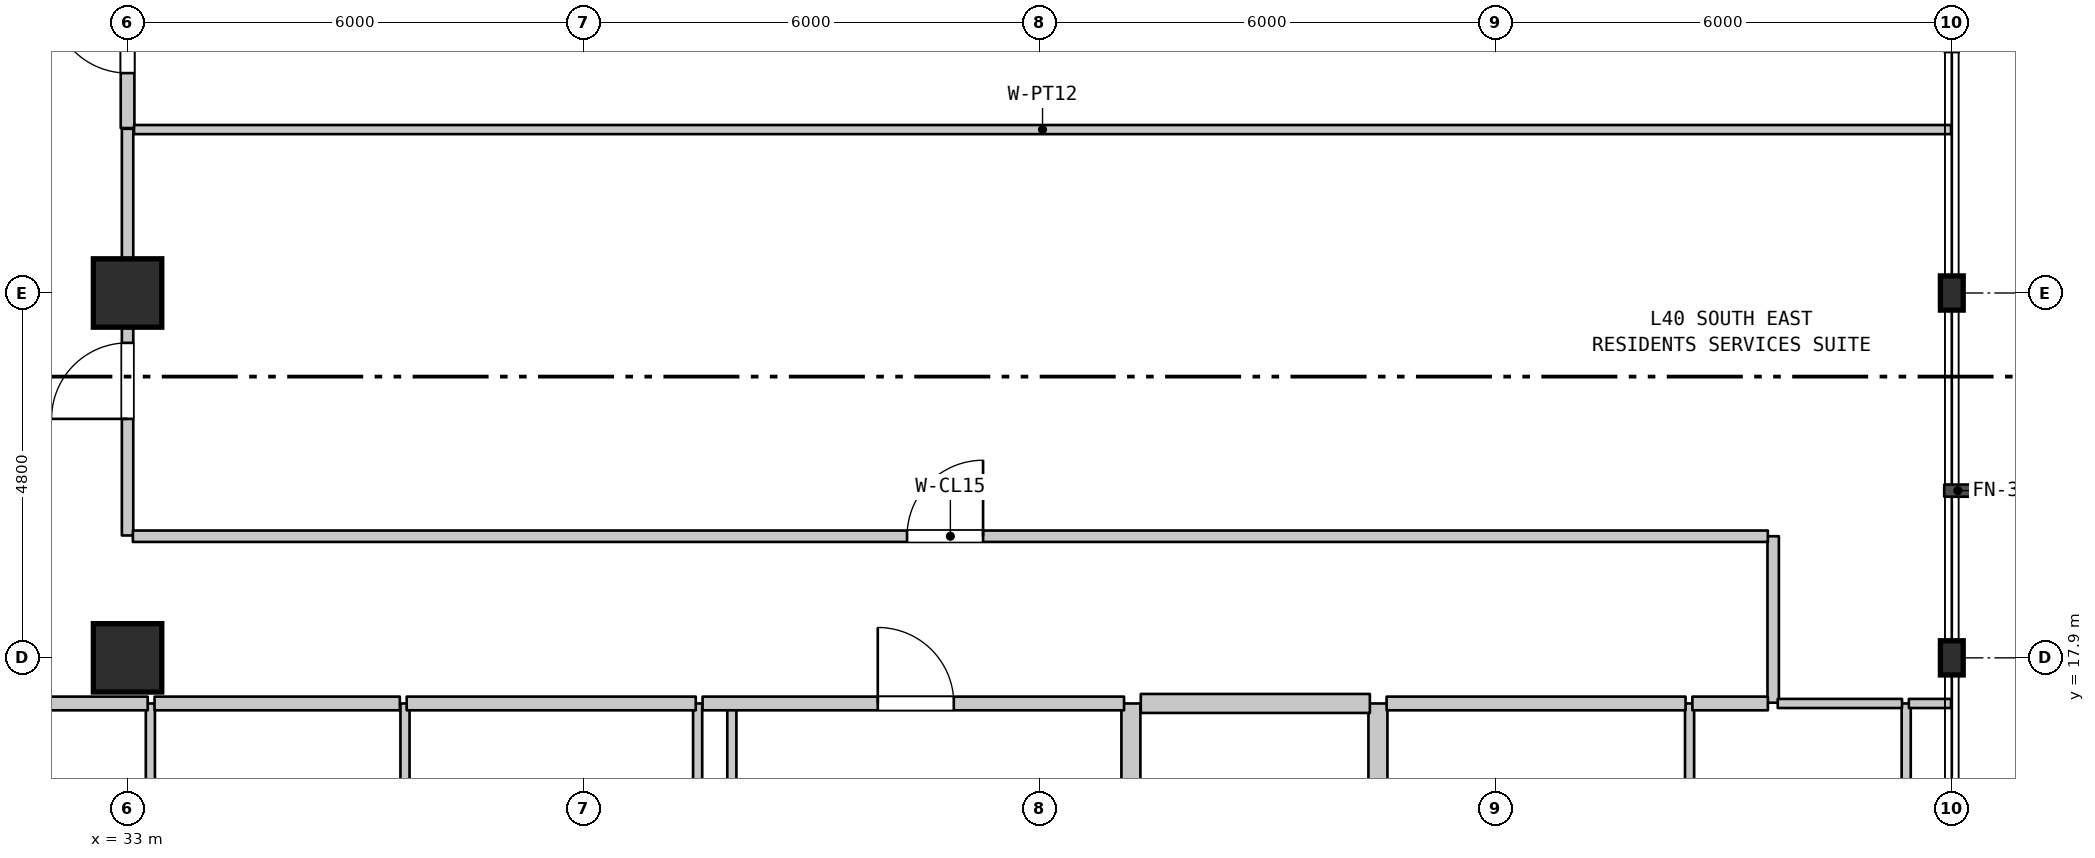
"""IFC4 building model, lengths in metres.
Left out: names, types, materials, properties, quantities, classifications, styles, units other than length and angle.
Written with IfcOpenShell. Run it as: python <this file> out.ifc"""

import sys

from ifc_helpers import new_model, si_unit, direction, frame, frame_2d, origin, origin_2d, place, context, subcontext, project, spatial, rectangle, i_section, extrude, element, fill, save


model = new_model("IFC4")
c1 = context("Model", 3, precision=1e-05, world=origin(), true_north=direction((0.0, 1.0)))
c2 = subcontext(c1, "Body", "Model", "MODEL_VIEW")
j1 = project(units=[si_unit("LENGTHUNIT", "METRE"), si_unit("PLANEANGLEUNIT", "RADIAN")], contexts=[c1])
p1 = place(None, origin())
s1 = spatial("IfcSite", under=j1, at=p1, CompositionType="ELEMENT")
p2 = place(p1, origin())
s2 = spatial("IfcBuilding", under=s1, at=p2, CompositionType="ELEMENT")
p3 = place(p2, frame((0.0, 0.0, 164.6)))
s3 = spatial("IfcBuildingStorey", under=s2, at=p3, CompositionType="ELEMENT", Elevation=164.6)
for number, where, z_axis, x_axis in (
    (1, (33.0, 17.9, 0.0), (0.0, 0.0, 1.0), (1.0, 0.0, 0.0)),
    (2, (33.0, 22.7, 0.0), (0.0, 0.0, 1.0), (1.0, 0.0, 0.0)),
):
    element("IfcColumn", number, at=place(p3, frame(where, z_axis=z_axis, x_axis=x_axis)), inside=s3, PredefinedType="COLUMN", context=c2, shape_type="SweptSolid", body=[
        extrude(rectangle(XDim=0.9, YDim=0.9, at=origin_2d()), origin(), (0.0, 0.0, 1.0), 4.5),
    ])
for number, where, z_axis, x_axis in (
    (3, (57.0, 17.9, 0.0), (0.0, 0.0, 1.0), (1.0, 0.0, 0.0)),
    (4, (57.0, 22.7, 0.0), (0.0, 0.0, 1.0), (1.0, 0.0, 0.0)),
):
    element("IfcColumn", number, at=place(p3, frame(where, z_axis=z_axis, x_axis=x_axis)), inside=s3, PredefinedType="COLUMN", context=c2, shape_type="SweptSolid", body=[
        extrude(i_section(OverallWidth=0.3, OverallDepth=0.45, WebThickness=0.014, FlangeThickness=0.026, FilletRadius=0.027, at=origin_2d()), origin(), (0.0, 0.0, 1.0), 4.5),
    ])
p4 = place(p3, frame((33.0, 19.51, 0.0), z_axis=(0.0, 0.0, 1.0), x_axis=(0.0, 1.0, 0.0)))
e5 = element("IfcWall", 5, at=p4, inside=s3, PredefinedType="STANDARD", context=c2, shape_type="SweptSolid", body=[
    extrude(rectangle(XDim=5.35, YDim=0.15, at=frame_2d((2.675, 0.0))), origin(), (0.0, 0.0, 1.0), 3.79),
])
p5 = place(p4, frame((1.534, 0.0, 0.0)))
e6 = element("IfcOpeningElement", 6, at=p5, cuts=e5, PredefinedType="OPENING", context=c2, shape_type="SweptSolid", body=[
    extrude(rectangle(XDim=1.0, YDim=2.15, at=frame_2d((0.5, 1.075))), frame((0.0, 0.085, 0.0), z_axis=(0.0, -1.0, 0.0), x_axis=(1.0, 0.0, 0.0)), (0.0, 0.0, 1.0), 0.17),
])
p6 = place(p3, frame((33.0, 24.87, 0.0), z_axis=(0.0, 0.0, 1.0), x_axis=(0.0, 1.0, 0.0)))
e7 = element("IfcWall", 7, at=p6, inside=s3, PredefinedType="STANDARD", context=c2, shape_type="SweptSolid", body=[
    extrude(rectangle(XDim=2.6, YDim=0.18, at=frame_2d((1.3, 0.0))), origin(), (0.0, 0.0, 1.0), 3.79),
])
p7 = place(p6, frame((0.723, 0.0, 0.0)))
e8 = element("IfcOpeningElement", 8, at=p7, cuts=e7, PredefinedType="OPENING", context=c2, shape_type="SweptSolid", body=[
    extrude(rectangle(XDim=1.0, YDim=2.15, at=frame_2d((0.5, 1.075))), frame((0.0, 0.1, 0.0), z_axis=(0.0, -1.0, 0.0), x_axis=(1.0, 0.0, 0.0)), (0.0, 0.0, 1.0), 0.2),
])
for number, where, z_axis, x_axis in (
    (9, (33.3, 11.15, 0.0), (0.0, 0.0, 1.0), (0.0, 1.0, 0.0)),
    (10, (36.65, 11.15, 0.0), (0.0, 0.0, 1.0), (0.0, 1.0, 0.0)),
    (11, (40.5, 11.15, 0.0), (0.0, 0.0, 1.0), (0.0, 1.0, 0.0)),
):
    element("IfcWall", number, at=place(p3, frame(where, z_axis=z_axis, x_axis=x_axis)), inside=s3, PredefinedType="PARTITIONING", context=c2, shape_type="SweptSolid", body=[
        extrude(rectangle(XDim=6.15, YDim=0.12, at=frame_2d((3.075, 0.0))), origin(), (0.0, 0.0, 1.0), 4.19),
    ])
p8 = place(p3, frame((40.95, 14.85, 0.0), z_axis=(0.0, 0.0, 1.0), x_axis=(0.0, 1.0, 0.0)))
e12 = element("IfcWall", 12, at=p8, inside=s3, PredefinedType="PARTITIONING", context=c2, shape_type="SweptSolid", body=[
    extrude(rectangle(XDim=2.45, YDim=0.12, at=frame_2d((1.225, 0.0))), origin(), (0.0, 0.0, 1.0), 4.19),
])
for number, where, z_axis, x_axis in (
    (13, (46.2, 11.15, 0.0), (0.0, 0.0, 1.0), (0.0, 1.0, 0.0)),
    (14, (49.45, 11.15, 0.0), (0.0, 0.0, 1.0), (0.0, 1.0, 0.0)),
):
    element("IfcWall", number, at=place(p3, frame(where, z_axis=z_axis, x_axis=x_axis)), inside=s3, PredefinedType="STANDARD", context=c2, shape_type="SweptSolid", body=[
        extrude(rectangle(XDim=6.15, YDim=0.25, at=frame_2d((3.075, 0.0))), origin(), (0.0, 0.0, 1.0), 4.19),
    ])
p9 = place(p3, frame((53.55, 11.15, 0.0), z_axis=(0.0, 0.0, 1.0), x_axis=(0.0, 1.0, 0.0)))
e15 = element("IfcWall", 15, at=p9, inside=s3, PredefinedType="PARTITIONING", context=c2, shape_type="SweptSolid", body=[
    extrude(rectangle(XDim=6.15, YDim=0.12, at=frame_2d((3.075, 0.0))), origin(), (0.0, 0.0, 1.0), 4.19),
])
p10 = place(p3, frame((54.65, 17.31, 0.0), z_axis=(0.0, 0.0, 1.0), x_axis=(0.0, 1.0, 0.0)))
e16 = element("IfcWall", 16, at=p10, inside=s3, PredefinedType="STANDARD", context=c2, shape_type="SweptSolid", body=[
    extrude(rectangle(XDim=2.19, YDim=0.15, at=frame_2d((1.095, 0.0))), origin(), (0.0, 0.0, 1.0), 4.19),
])
p11 = place(p3, frame((56.4, 11.15, 0.0), z_axis=(0.0, 0.0, 1.0), x_axis=(0.0, 1.0, 0.0)))
e17 = element("IfcWall", 17, at=p11, inside=s3, PredefinedType="PARTITIONING", context=c2, shape_type="SweptSolid", body=[
    extrude(rectangle(XDim=6.15, YDim=0.12, at=frame_2d((3.075, 0.0))), origin(), (0.0, 0.0, 1.0), 4.19),
])
p12 = place(p3, frame((28.545, 17.3, 0.0), z_axis=(0.0, 0.0, 1.0), x_axis=(1.0, 0.0, 0.0)))
e18 = element("IfcWall", 18, at=p12, inside=s3, PredefinedType="STANDARD", context=c2, shape_type="SweptSolid", body=[
    extrude(rectangle(XDim=4.72, YDim=0.18, at=frame_2d((2.36, 0.0))), origin(), (0.0, 0.0, 1.0), 4.19),
])
p13 = place(p12, frame((1.788, 0.0, 0.0)))
e19 = element("IfcOpeningElement", 19, at=p13, cuts=e18, PredefinedType="OPENING", context=c2, shape_type="SweptSolid", body=[
    extrude(rectangle(XDim=1.0, YDim=2.15, at=frame_2d((0.5, 1.075))), frame((0.0, 0.1, 0.0), z_axis=(0.0, -1.0, 0.0), x_axis=(1.0, 0.0, 0.0)), (0.0, 0.0, 1.0), 0.2),
])
p14 = place(p3, frame((33.355, 17.3, 0.0), z_axis=(0.0, 0.0, 1.0), x_axis=(1.0, 0.0, 0.0)))
e20 = element("IfcWall", 20, at=p14, inside=s3, PredefinedType="STANDARD", context=c2, shape_type="SweptSolid", body=[
    extrude(rectangle(XDim=3.227, YDim=0.18, at=frame_2d((1.614, 0.0))), origin(), (0.0, 0.0, 1.0), 4.19),
])
p15 = place(p3, frame((36.672, 17.3, 0.0), z_axis=(0.0, 0.0, 1.0), x_axis=(1.0, 0.0, 0.0)))
e21 = element("IfcWall", 21, at=p15, inside=s3, PredefinedType="STANDARD", context=c2, shape_type="SweptSolid", body=[
    extrude(rectangle(XDim=3.803, YDim=0.18, at=frame_2d((1.901, 0.0))), origin(), (0.0, 0.0, 1.0), 4.19),
])
p16 = place(p3, frame((40.565, 17.3, 0.0), z_axis=(0.0, 0.0, 1.0), x_axis=(1.0, 0.0, 0.0)))
e22 = element("IfcWall", 22, at=p16, inside=s3, PredefinedType="STANDARD", context=c2, shape_type="SweptSolid", body=[
    extrude(rectangle(XDim=5.545, YDim=0.18, at=frame_2d((2.772, 0.0))), origin(), (0.0, 0.0, 1.0), 4.19),
])
p17 = place(p16, frame((2.305, 0.0, 0.0)))
e23 = element("IfcOpeningElement", 23, at=p17, cuts=e22, PredefinedType="OPENING", context=c2, shape_type="SweptSolid", body=[
    extrude(rectangle(XDim=1.0, YDim=2.15, at=frame_2d((0.5, 1.075))), frame((0.0, 0.1, 0.0), z_axis=(0.0, -1.0, 0.0), x_axis=(1.0, 0.0, 0.0)), (0.0, 0.0, 1.0), 0.2),
])
p18 = place(p3, frame((46.33, 17.3, 0.0), z_axis=(0.0, 0.0, 1.0), x_axis=(1.0, 0.0, 0.0)))
e24 = element("IfcWall", 24, at=p18, inside=s3, PredefinedType="STANDARD", context=c2, shape_type="SweptSolid", body=[
    extrude(rectangle(XDim=3.014, YDim=0.25, at=frame_2d((1.507, 0.0))), origin(), (0.0, 0.0, 1.0), 4.19),
])
p19 = place(p3, frame((49.564, 17.3, 0.0), z_axis=(0.0, 0.0, 1.0), x_axis=(1.0, 0.0, 0.0)))
e25 = element("IfcWall", 25, at=p19, inside=s3, PredefinedType="STANDARD", context=c2, shape_type="SweptSolid", body=[
    extrude(rectangle(XDim=3.933, YDim=0.18, at=frame_2d((1.967, 0.0))), origin(), (0.0, 0.0, 1.0), 4.19),
])
p20 = place(p3, frame((53.587, 17.3, 0.0), z_axis=(0.0, 0.0, 1.0), x_axis=(1.0, 0.0, 0.0)))
e26 = element("IfcWall", 26, at=p20, inside=s3, PredefinedType="STANDARD", context=c2, shape_type="SweptSolid", body=[
    extrude(rectangle(XDim=0.993, YDim=0.18, at=frame_2d((0.497, 0.0))), origin(), (0.0, 0.0, 1.0), 4.19),
])
p21 = place(p3, frame((54.71, 17.3, 0.0), z_axis=(0.0, 0.0, 1.0), x_axis=(1.0, 0.0, 0.0)))
e27 = element("IfcWall", 27, at=p21, inside=s3, PredefinedType="PARTITIONING", context=c2, shape_type="SweptSolid", body=[
    extrude(rectangle(XDim=1.635, YDim=0.12, at=frame_2d((0.817, 0.0))), origin(), (0.0, 0.0, 1.0), 4.19),
])
p22 = place(p3, frame((56.435, 17.3, 0.0), z_axis=(0.0, 0.0, 1.0), x_axis=(1.0, 0.0, 0.0)))
e28 = element("IfcWall", 28, at=p22, inside=s3, PredefinedType="PARTITIONING", context=c2, shape_type="SweptSolid", body=[
    extrude(rectangle(XDim=0.555, YDim=0.12, at=frame_2d((0.277, 0.0))), origin(), (0.0, 0.0, 1.0), 4.19),
])
p23 = place(p3, frame((33.07, 19.5, 0.0), z_axis=(0.0, 0.0, 1.0), x_axis=(1.0, 0.0, 0.0)))
e29 = element("IfcWall", 29, at=p23, inside=s3, PredefinedType="STANDARD", context=c2, shape_type="SweptSolid", body=[
    extrude(rectangle(XDim=21.51, YDim=0.15, at=frame_2d((10.755, 0.0))), origin(), (0.0, 0.0, 1.0), 4.19),
])
p24 = place(p23, frame((10.185, 0.0, 0.0)))
e30 = element("IfcOpeningElement", 30, at=p24, cuts=e29, PredefinedType="OPENING", context=c2, shape_type="SweptSolid", body=[
    extrude(rectangle(XDim=1.0, YDim=2.15, at=frame_2d((0.5, 1.075))), frame((0.0, 0.085, 0.0), z_axis=(0.0, -1.0, 0.0), x_axis=(1.0, 0.0, 0.0)), (0.0, 0.0, 1.0), 0.17),
])
p25 = place(p3, frame((33.085, 24.85, 0.0), z_axis=(0.0, 0.0, 1.0), x_axis=(1.0, 0.0, 0.0)))
e31 = element("IfcWall", 31, at=p25, inside=s3, PredefinedType="PARTITIONING", context=c2, shape_type="SweptSolid", body=[
    extrude(rectangle(XDim=23.905, YDim=0.12, at=frame_2d((11.953, 0.0))), origin(), (0.0, 0.0, 1.0), 4.19),
])
p26 = place(p5, origin())
e32 = element("IfcDoor", 32, at=p26, inside=s3, OperationType="SINGLE_SWING_LEFT", PredefinedType="DOOR", context=c2, shape_type="SweptSolid", body=[
    extrude(rectangle(XDim=1.0, YDim=2.15, at=frame_2d((0.5, 1.075))), frame((0.0, 0.025, 0.0), z_axis=(0.0, -1.0, 0.0), x_axis=(1.0, 0.0, 0.0)), (0.0, 0.0, 1.0), 0.05),
])
fill(e6, e32)
p27 = place(p7, origin())
e33 = element("IfcDoor", 33, at=p27, inside=s3, OperationType="SINGLE_SWING_RIGHT", PredefinedType="DOOR", context=c2, shape_type="SweptSolid", body=[
    extrude(rectangle(XDim=1.0, YDim=2.15, at=frame_2d((0.5, 1.075))), frame((0.0, 0.025, 0.0), z_axis=(0.0, -1.0, 0.0), x_axis=(1.0, 0.0, 0.0)), (0.0, 0.0, 1.0), 0.05),
])
fill(e8, e33)
p28 = place(p17, origin())
e34 = element("IfcDoor", 34, at=p28, inside=s3, OperationType="SINGLE_SWING_LEFT", PredefinedType="DOOR", context=c2, shape_type="SweptSolid", body=[
    extrude(rectangle(XDim=1.0, YDim=2.15, at=frame_2d((0.5, 1.075))), frame((0.0, 0.025, 0.0), z_axis=(0.0, -1.0, 0.0), x_axis=(1.0, 0.0, 0.0)), (0.0, 0.0, 1.0), 0.05),
])
fill(e23, e34)
p29 = place(p24, origin())
e35 = element("IfcDoor", 35, at=p29, inside=s3, OperationType="SINGLE_SWING_RIGHT", PredefinedType="DOOR", context=c2, shape_type="SweptSolid", body=[
    extrude(rectangle(XDim=1.0, YDim=2.15, at=frame_2d((0.5, 1.075))), frame((0.0, 0.025, 0.0), z_axis=(0.0, -1.0, 0.0), x_axis=(1.0, 0.0, 0.0)), (0.0, 0.0, 1.0), 0.05),
])
fill(e30, e35)
save(model, sys.argv[1])
